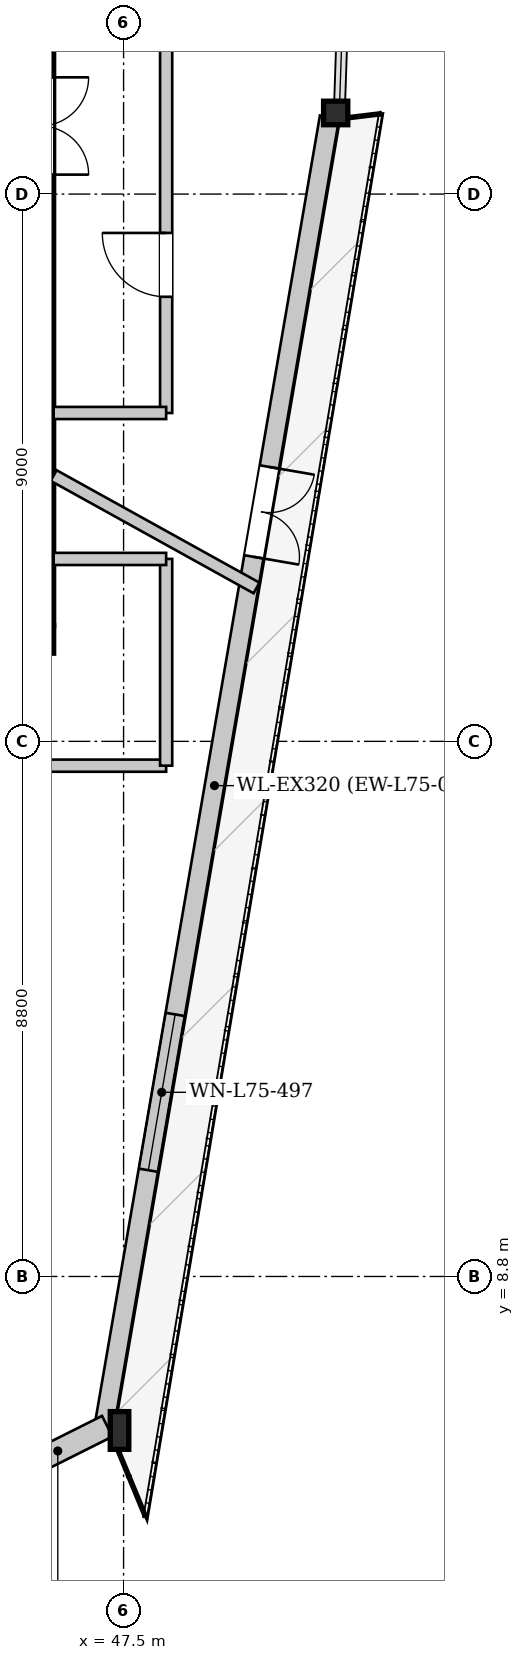
"""IFC4 building model, lengths in metres.
Left out: names, types, materials, properties, quantities, classifications, styles, units other than length and angle.
Written with IfcOpenShell. Run it as: python <this file> out.ifc"""

import sys

from ifc_helpers import new_model, si_unit, direction, frame, frame_2d, origin, origin_2d, place, context, subcontext, project, spatial, rectangle, i_section, extrude, source, transform, mapped, element, fill, save


model = new_model("IFC4")
c1 = context("Model", 3, precision=1e-05, world=origin(), true_north=direction((0.0, 1.0)))
c2 = subcontext(c1, "Body", "Model", "MODEL_VIEW")
j1 = project(units=[si_unit("LENGTHUNIT", "METRE"), si_unit("PLANEANGLEUNIT", "RADIAN")], contexts=[c1])
p1 = place(None, origin())
s1 = spatial("IfcSite", under=j1, at=p1, CompositionType="ELEMENT")
p2 = place(p1, origin())
s2 = spatial("IfcBuilding", under=s1, at=p2, CompositionType="ELEMENT")
p3 = place(p2, frame((0.0, 0.0, 281.9)))
s3 = spatial("IfcBuildingStorey", under=s2, at=p3, CompositionType="ELEMENT", Elevation=281.9)
m1 = source(origin(), c2, "Body", "SweptSolid", [
    extrude(i_section(OverallWidth=0.305, OverallDepth=0.62, WebThickness=0.021, FlangeThickness=0.04, at=origin_2d()), origin(), (0.0, 0.0, 1.0), 3.959),
])
p4 = place(p3, frame((45.69, 5.353, 0.0), z_axis=(0.091887262438, 0.059572547325, 0.99398583622), x_axis=(-0.543998260544, 0.839086343903, 0.0)))
e1 = element("IfcColumn", 1, at=p4, inside=s3, PredefinedType="COLUMN", context=c2, shape_type="MappedRepresentation", body=[
    mapped(m1, transform((0.0, 0.0, 0.0), x_axis=(1.0, 0.0, 0.0), y_axis=(0.0, 1.0, 0.0), z_axis=(0.0, 0.0, 1.0), scale=1.0)),
])
m2 = source(origin(), c2, "Body", "SweptSolid", [
    extrude(i_section(OverallWidth=0.305, OverallDepth=0.62, WebThickness=0.021, FlangeThickness=0.04, at=origin_2d()), origin(), (0.0, 0.0, 1.0), 3.947),
])
p5 = place(p3, frame((47.316, 6.167, 0.0), z_axis=(0.059317030489, 0.050781315987, 0.996946712638), x_axis=(-0.650334618995, 0.759647867986, 0.0)))
e2 = element("IfcColumn", 2, at=p5, inside=s3, PredefinedType="COLUMN", context=c2, shape_type="MappedRepresentation", body=[
    mapped(m2, transform((0.0, 0.0, 0.0), x_axis=(1.0, 0.0, 0.0), y_axis=(0.0, 1.0, 0.0), z_axis=(0.0, 0.0, 1.0), scale=1.0)),
])
m3 = source(origin(), c2, "Body", "SweptSolid", [
    extrude(i_section(OverallWidth=0.398, OverallDepth=0.387, WebThickness=0.019, FlangeThickness=0.029, at=origin_2d()), origin(), (0.0, 0.0, 1.0), 3.941),
])
p6 = place(p3, frame((51.044, 27.838, 0.0), z_axis=(-0.028432007479, 0.048811376674, 0.99840326044), x_axis=(-0.864096904342, -0.503325481082, 0.0)))
e3 = element("IfcColumn", 3, at=p6, inside=s3, PredefinedType="COLUMN", context=c2, shape_type="MappedRepresentation", body=[
    mapped(m3, transform((0.0, 0.0, 0.0), x_axis=(1.0, 0.0, 0.0), y_axis=(0.0, 1.0, 0.0), z_axis=(0.0, 0.0, 1.0), scale=1.0)),
])
p7 = place(p3, frame((50.887, 27.865, 0.0), z_axis=(0.0, 0.0, 1.0), x_axis=(-0.169551460744, -0.985521335213, 0.0)))
e4 = element("IfcWall", 4, at=p7, inside=s3, PredefinedType="SOLIDWALL", context=c2, shape_type="SweptSolid", body=[
    extrude(rectangle(XDim=21.989, YDim=0.32, at=frame_2d((10.995, 0.0))), origin(), (0.0, 0.0, 1.0), 3.462),
])
p8 = place(p7, frame((5.837, 0.0, 0.0)))
e5 = element("IfcOpeningElement", 5, at=p8, cuts=e4, PredefinedType="OPENING", context=c2, shape_type="SweptSolid", body=[
    extrude(rectangle(XDim=1.5, YDim=2.3, at=frame_2d((0.75, 1.15))), frame((0.0, 0.17, 0.0), z_axis=(0.0, -1.0, 0.0), x_axis=(1.0, 0.0, 0.0)), (0.0, 0.0, 1.0), 0.34),
])
p9 = place(p7, frame((14.972, 0.0, 0.65)))
e6 = element("IfcOpeningElement", 6, at=p9, cuts=e4, PredefinedType="OPENING", context=c2, shape_type="SweptSolid", body=[
    extrude(rectangle(XDim=2.6, YDim=2.35, at=frame_2d((1.3, 1.175))), frame((0.0, 0.17, 0.0), z_axis=(0.0, -1.0, 0.0), x_axis=(1.0, 0.0, 0.0)), (0.0, 0.0, 1.0), 0.34),
])
p10 = place(p3, frame((47.231, 6.337, 0.0), z_axis=(0.0, 0.0, 1.0), x_axis=(-0.894131681519, -0.44780412694, 0.0)))
e7 = element("IfcWall", 7, at=p10, inside=s3, PredefinedType="SOLIDWALL", context=c2, shape_type="SweptSolid", body=[
    extrude(rectangle(XDim=1.819, YDim=0.38, at=frame_2d((0.909, 0.0))), origin(), (0.0, 0.0, 1.0), 3.462),
])
p11 = place(p3, frame((46.35, 19.275, 0.0), z_axis=(0.0, 0.0, 1.0), x_axis=(-1.0, 0.0, 0.0)))
e8 = element("IfcWall", 8, at=p11, inside=s3, PredefinedType="SHEAR", context=c2, shape_type="SweptSolid", body=[
    extrude(rectangle(XDim=16.7, YDim=0.45, at=frame_2d((8.35, 0.0))), origin(), (0.0, 0.0, 1.0), 3.92),
])
p12 = place(p11, frame((4.55, 0.0, 0.0)))
e9 = element("IfcOpeningElement", 9, at=p12, cuts=e8, PredefinedType="OPENING", context=c2, shape_type="SweptSolid", body=[
    extrude(rectangle(XDim=1.12, YDim=2.25, at=frame_2d((0.56, 1.125))), frame((0.0, 0.235, 0.0), z_axis=(0.0, -1.0, 0.0), x_axis=(1.0, 0.0, 0.0)), (0.0, 0.0, 1.0), 0.47),
])
p13 = place(p11, frame((11.05, 0.0, 0.0)))
e10 = element("IfcOpeningElement", 10, at=p13, cuts=e8, PredefinedType="OPENING", context=c2, shape_type="SweptSolid", body=[
    extrude(rectangle(XDim=1.12, YDim=2.25, at=frame_2d((0.56, 1.125))), frame((0.0, 0.235, 0.0), z_axis=(0.0, -1.0, 0.0), x_axis=(1.0, 0.0, 0.0)), (0.0, 0.0, 1.0), 0.47),
])
p14 = place(p3, frame((46.125, 33.7, 0.0), z_axis=(0.0, 0.0, 1.0), x_axis=(0.0, -1.0, 0.0)))
e11 = element("IfcWall", 11, at=p14, inside=s3, PredefinedType="SHEAR", context=c2, shape_type="SweptSolid", body=[
    extrude(rectangle(XDim=14.2, YDim=0.45, at=frame_2d((7.1, 0.0))), origin(), (0.0, 0.0, 1.0), 3.92),
])
p15 = place(p14, frame((5.18, 0.0, 0.0)))
e12 = element("IfcOpeningElement", 12, at=p15, cuts=e11, PredefinedType="OPENING", context=c2, shape_type="SweptSolid", body=[
    extrude(rectangle(XDim=1.6, YDim=2.2, at=frame_2d((0.8, 1.1))), frame((0.0, 0.235, 0.0), z_axis=(0.0, -1.0, 0.0), x_axis=(1.0, 0.0, 0.0)), (0.0, 0.0, 1.0), 0.47),
])
p16 = place(p14, frame((2.05, 0.0, 0.0)))
e13 = element("IfcOpeningElement", 13, at=p16, cuts=e11, PredefinedType="OPENING", context=c2, shape_type="SweptSolid", body=[
    extrude(rectangle(XDim=0.95, YDim=2.1, at=frame_2d((0.475, 1.05))), frame((0.0, 0.235, 0.0), z_axis=(0.0, -1.0, 0.0), x_axis=(1.0, 0.0, 0.0)), (0.0, 0.0, 1.0), 0.47),
])
p17 = place(p3, frame((46.35, 21.971, 0.0), z_axis=(0.0, 0.0, 1.0), x_axis=(0.874624795307, -0.484800440835, 0.0)))
e14 = element("IfcWall", 14, at=p17, inside=s3, PredefinedType="PARTITIONING", context=c2, shape_type="SweptSolid", body=[
    extrude(rectangle(XDim=3.815, YDim=0.2, at=frame_2d((1.907, 0.0))), origin(), (0.0, 0.0, 1.0), 3.92),
])
p18 = place(p3, frame((27.8, 17.2, 0.0), z_axis=(0.0, 0.0, 1.0), x_axis=(1.0, 0.0, 0.0)))
e15 = element("IfcWall", 15, at=p18, inside=s3, PredefinedType="PARTITIONING", context=c2, shape_type="SweptSolid", body=[
    extrude(rectangle(XDim=20.4, YDim=0.2, at=frame_2d((10.2, 0.0))), origin(), (0.0, 0.0, 1.0), 3.92),
])
p19 = place(p18, frame((5.209, 0.0, 0.0)))
e16 = element("IfcOpeningElement", 16, at=p19, cuts=e15, PredefinedType="OPENING", context=c2, shape_type="SweptSolid", body=[
    extrude(rectangle(XDim=1.05, YDim=2.2, at=frame_2d((0.525, 1.1))), frame((0.0, 0.11, 0.0), z_axis=(0.0, -1.0, 0.0), x_axis=(1.0, 0.0, 0.0)), (0.0, 0.0, 1.0), 0.22),
])
p20 = place(p18, frame((15.339, 0.0, 0.0)))
e17 = element("IfcOpeningElement", 17, at=p20, cuts=e15, PredefinedType="OPENING", context=c2, shape_type="SweptSolid", body=[
    extrude(rectangle(XDim=1.05, YDim=2.2, at=frame_2d((0.525, 1.1))), frame((0.0, 0.11, 0.0), z_axis=(0.0, -1.0, 0.0), x_axis=(1.0, 0.0, 0.0)), (0.0, 0.0, 1.0), 0.22),
])
p21 = place(p3, frame((48.2, 17.2, 0.0), z_axis=(0.0, 0.0, 1.0), x_axis=(0.0, 1.0, 0.0)))
e18 = element("IfcWall", 18, at=p21, inside=s3, PredefinedType="PARTITIONING", context=c2, shape_type="SweptSolid", body=[
    extrude(rectangle(XDim=3.4, YDim=0.2, at=frame_2d((1.7, 0.0))), origin(), (0.0, 0.0, 1.0), 3.92),
])
p22 = place(p3, frame((46.35, 20.6, 0.0), z_axis=(0.0, 0.0, 1.0), x_axis=(1.0, 0.0, 0.0)))
e19 = element("IfcWall", 19, at=p22, inside=s3, PredefinedType="PARTITIONING", context=c2, shape_type="SweptSolid", body=[
    extrude(rectangle(XDim=1.85, YDim=0.2, at=frame_2d((0.925, 0.0))), origin(), (0.0, 0.0, 1.0), 3.92),
])
p23 = place(p3, frame((48.2, 23.0, 0.0), z_axis=(0.0, 0.0, 1.0), x_axis=(0.0, 1.0, 0.0)))
e20 = element("IfcWall", 20, at=p23, inside=s3, PredefinedType="PARTITIONING", context=c2, shape_type="SweptSolid", body=[
    extrude(rectangle(XDim=13.0, YDim=0.2, at=frame_2d((6.5, 0.0))), origin(), (0.0, 0.0, 1.0), 3.665),
])
p24 = place(p23, frame((1.911, 0.0, 0.0)))
e21 = element("IfcOpeningElement", 21, at=p24, cuts=e20, PredefinedType="OPENING", context=c2, shape_type="SweptSolid", body=[
    extrude(rectangle(XDim=1.05, YDim=2.2, at=frame_2d((0.525, 1.1))), frame((0.0, 0.11, 0.0), z_axis=(0.0, -1.0, 0.0), x_axis=(1.0, 0.0, 0.0)), (0.0, 0.0, 1.0), 0.22),
])
p25 = place(p23, frame((11.65, 0.0, 0.0)))
e22 = element("IfcOpeningElement", 22, at=p25, cuts=e20, PredefinedType="OPENING", context=c2, shape_type="SweptSolid", body=[
    extrude(rectangle(XDim=1.05, YDim=2.2, at=frame_2d((0.525, 1.1))), frame((0.0, 0.11, 0.0), z_axis=(0.0, -1.0, 0.0), x_axis=(1.0, 0.0, 0.0)), (0.0, 0.0, 1.0), 0.22),
])
p26 = place(p3, frame((46.35, 23.0, 0.0), z_axis=(0.0, 0.0, 1.0), x_axis=(1.0, 0.0, 0.0)))
e23 = element("IfcWall", 23, at=p26, inside=s3, PredefinedType="PARTITIONING", context=c2, shape_type="SweptSolid", body=[
    extrude(rectangle(XDim=1.85, YDim=0.2, at=frame_2d((0.925, 0.0))), origin(), (0.0, 0.0, 1.0), 3.92),
])
m4 = source(origin(), c2, "Body", "SweptSolid", [
    extrude(rectangle(XDim=1.5, YDim=2.3, at=frame_2d((0.75, 1.15))), frame((0.0, 0.025, 0.0), z_axis=(0.0, -1.0, 0.0), x_axis=(1.0, 0.0, 0.0)), (0.0, 0.0, 1.0), 0.05),
])
p27 = place(p8, origin())
e24 = element("IfcDoor", 24, at=p27, inside=s3, OperationType="DOUBLE_DOOR_SINGLE_SWING", PredefinedType="DOOR", context=c2, shape_type="MappedRepresentation", body=[
    mapped(m4, transform((0.0, 0.0, 0.0), x_axis=(1.0, 0.0, 0.0), y_axis=(0.0, 1.0, 0.0), z_axis=(0.0, 0.0, 1.0), scale=1.0)),
])
fill(e5, e24)
m5 = source(origin(), c2, "Body", "SweptSolid", [
    extrude(rectangle(XDim=2.6, YDim=2.35, at=frame_2d((1.3, 1.175))), frame((0.0, 0.03, 0.0), z_axis=(0.0, -1.0, 0.0), x_axis=(1.0, 0.0, 0.0)), (0.0, 0.0, 1.0), 0.06),
])
p28 = place(p9, origin())
e25 = element("IfcWindow", 25, at=p28, inside=s3, PartitioningType="SINGLE_PANEL", PredefinedType="WINDOW", context=c2, shape_type="MappedRepresentation", body=[
    mapped(m5, transform((0.0, 0.0, 0.0), x_axis=(1.0, 0.0, 0.0), y_axis=(0.0, 1.0, 0.0), z_axis=(0.0, 0.0, 1.0), scale=1.0)),
])
fill(e6, e25)
m6 = source(origin(), c2, "Body", "SweptSolid", [
    extrude(rectangle(XDim=1.05, YDim=2.2, at=frame_2d((0.525, 1.1))), frame((0.0, 0.025, 0.0), z_axis=(0.0, -1.0, 0.0), x_axis=(1.0, 0.0, 0.0)), (0.0, 0.0, 1.0), 0.05),
])
p29 = place(p24, origin())
e26 = element("IfcDoor", 26, at=p29, inside=s3, OperationType="SINGLE_SWING_RIGHT", PredefinedType="DOOR", context=c2, shape_type="MappedRepresentation", body=[
    mapped(m6, transform((0.0, 0.0, 0.0), x_axis=(1.0, 0.0, 0.0), y_axis=(0.0, 1.0, 0.0), z_axis=(0.0, 0.0, 1.0), scale=1.0)),
])
fill(e21, e26)
save(model, sys.argv[1])
